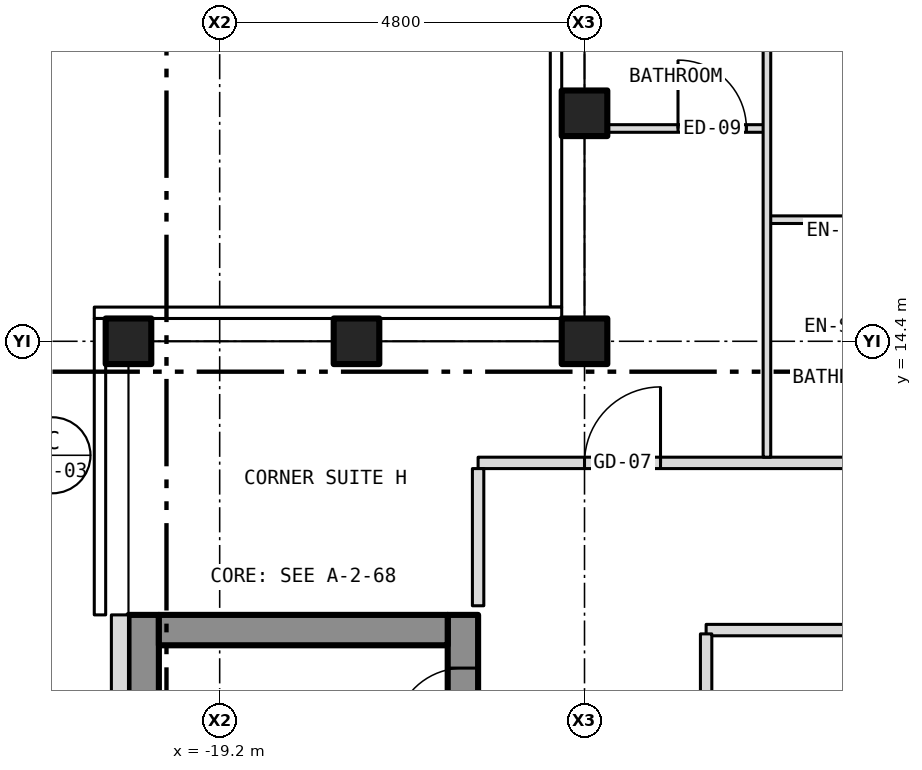
"""IFC4 building model, lengths in metres.
Left out: names, types, materials, properties, quantities, classifications, styles, units other than length and angle.
Written with IfcOpenShell. Run it as: python <this file> out.ifc"""

import sys

from ifc_helpers import new_model, si_unit, direction, frame, frame_2d, origin, origin_2d, place, context, subcontext, project, spatial, rectangle, hollow_rectangle, extrude, element, fill, save


model = new_model("IFC4")
c1 = context("Model", 3, precision=1e-05, world=origin(), true_north=direction((0.0, 1.0)))
c2 = subcontext(c1, "Body", "Model", "MODEL_VIEW")
j1 = project(units=[si_unit("LENGTHUNIT", "METRE"), si_unit("PLANEANGLEUNIT", "RADIAN")], contexts=[c1])
p1 = place(None, origin())
s1 = spatial("IfcSite", under=j1, at=p1, CompositionType="ELEMENT")
p2 = place(p1, origin())
s2 = spatial("IfcBuilding", under=s1, at=p2, CompositionType="ELEMENT")
p3 = place(p2, frame((0.0, 0.0, 248.0)))
s3 = spatial("IfcBuildingStorey", under=s2, at=p3, CompositionType="ELEMENT", Elevation=248.0)
for number, where, z_axis, x_axis in (
    (1, (-20.4, 14.4, -0.15), (0.0, 0.0, 1.0), (1.0, 0.0, 0.0)),
    (2, (-14.4, 14.4, -0.15), (0.0, 0.0, 1.0), (1.0, 0.0, 0.0)),
    (3, (-14.4, 17.4, -0.15), (0.0, 0.0, 1.0), (1.0, 0.0, 0.0)),
    (4, (-17.4, 14.4, -0.15), (0.0, 0.0, 1.0), (1.0, 0.0, 0.0)),
):
    element("IfcColumn", number, at=place(p3, frame(where, z_axis=z_axis, x_axis=x_axis)), inside=s3, PredefinedType="COLUMN", context=c2, shape_type="SweptSolid", body=[
        extrude(hollow_rectangle(XDim=0.6, YDim=0.6, WallThickness=0.03, at=origin_2d()), origin(), (0.0, 0.0, 1.0), 3.5),
    ])
p4 = place(p3, frame((-16.0, -10.8, 0.0), z_axis=(0.0, 0.0, 1.0), x_axis=(0.0, 1.0, 0.0)))
e5 = element("IfcWall", 5, at=p4, inside=s3, PredefinedType="SHEAR", context=c2, shape_type="SweptSolid", body=[
    extrude(rectangle(XDim=21.6, YDim=0.4, at=frame_2d((10.8, 0.0))), origin(), (0.0, 0.0, 1.0), 3.25),
])
p5 = place(p4, frame((9.4, 0.0, 0.0)))
e6 = element("IfcOpeningElement", 6, at=p5, cuts=e5, PredefinedType="OPENING", context=c2, shape_type="SweptSolid", body=[
    extrude(rectangle(XDim=1.1, YDim=2.1, at=frame_2d((0.55, 1.05))), frame((0.0, 0.212, 0.0), z_axis=(0.0, -1.0, 0.0), x_axis=(1.0, 0.0, 0.0)), (0.0, 0.0, 1.0), 0.424),
])
p6 = place(p4, frame((11.5, 0.0, 0.0)))
e7 = element("IfcOpeningElement", 7, at=p6, cuts=e5, PredefinedType="OPENING", context=c2, shape_type="SweptSolid", body=[
    extrude(rectangle(XDim=1.1, YDim=2.1, at=frame_2d((0.55, 1.05))), frame((0.0, 0.212, 0.0), z_axis=(0.0, -1.0, 0.0), x_axis=(1.0, 0.0, 0.0)), (0.0, 0.0, 1.0), 0.424),
])
p7 = place(p4, frame((13.6, 0.0, 0.0)))
e8 = element("IfcOpeningElement", 8, at=p7, cuts=e5, PredefinedType="OPENING", context=c2, shape_type="SweptSolid", body=[
    extrude(rectangle(XDim=1.1, YDim=2.1, at=frame_2d((0.55, 1.05))), frame((0.0, 0.212, 0.0), z_axis=(0.0, -1.0, 0.0), x_axis=(1.0, 0.0, 0.0)), (0.0, 0.0, 1.0), 0.424),
])
p8 = place(p4, frame((15.7, 0.0, 0.0)))
e9 = element("IfcOpeningElement", 9, at=p8, cuts=e5, PredefinedType="OPENING", context=c2, shape_type="SweptSolid", body=[
    extrude(rectangle(XDim=1.1, YDim=2.1, at=frame_2d((0.55, 1.05))), frame((0.0, 0.212, 0.0), z_axis=(0.0, -1.0, 0.0), x_axis=(1.0, 0.0, 0.0)), (0.0, 0.0, 1.0), 0.424),
])
p9 = place(p4, frame((17.8, 0.0, 0.0)))
e10 = element("IfcOpeningElement", 10, at=p9, cuts=e5, PredefinedType="OPENING", context=c2, shape_type="SweptSolid", body=[
    extrude(rectangle(XDim=1.1, YDim=2.1, at=frame_2d((0.55, 1.05))), frame((0.0, 0.212, 0.0), z_axis=(0.0, -1.0, 0.0), x_axis=(1.0, 0.0, 0.0)), (0.0, 0.0, 1.0), 0.424),
])
p10 = place(p4, frame((0.458, 0.0, 0.0)))
e11 = element("IfcOpeningElement", 11, at=p10, cuts=e5, PredefinedType="OPENING", context=c2, shape_type="SweptSolid", body=[
    extrude(rectangle(XDim=1.1, YDim=2.1, at=frame_2d((0.55, 1.05))), frame((0.0, 0.212, 0.0), z_axis=(0.0, -1.0, 0.0), x_axis=(1.0, 0.0, 0.0)), (0.0, 0.0, 1.0), 0.424),
])
p11 = place(p4, frame((7.5, 0.0, 0.0)))
e12 = element("IfcOpeningElement", 12, at=p11, cuts=e5, PredefinedType="OPENING", context=c2, shape_type="SweptSolid", body=[
    extrude(rectangle(XDim=1.1, YDim=2.1, at=frame_2d((0.55, 1.05))), frame((0.0, 0.212, 0.0), z_axis=(0.0, -1.0, 0.0), x_axis=(1.0, 0.0, 0.0)), (0.0, 0.0, 1.0), 0.424),
])
p12 = place(p4, frame((20.0, 0.0, 0.0)))
e13 = element("IfcOpeningElement", 13, at=p12, cuts=e5, PredefinedType="OPENING", context=c2, shape_type="SweptSolid", body=[
    extrude(rectangle(XDim=0.9, YDim=2.1, at=frame_2d((0.45, 1.05))), frame((0.0, 0.212, 0.0), z_axis=(0.0, -1.0, 0.0), x_axis=(1.0, 0.0, 0.0)), (0.0, 0.0, 1.0), 0.424),
])
p13 = place(p3, frame((-20.2, -10.8, 0.0), z_axis=(0.0, 0.0, 1.0), x_axis=(0.0, 1.0, 0.0)))
e14 = element("IfcWall", 14, at=p13, inside=s3, PredefinedType="SHEAR", context=c2, shape_type="SweptSolid", body=[
    extrude(rectangle(XDim=21.6, YDim=0.4, at=frame_2d((10.8, 0.0))), origin(), (0.0, 0.0, 1.0), 3.25),
])
p14 = place(p3, frame((-20.0, 10.6, 0.0), z_axis=(0.0, 0.0, 1.0), x_axis=(1.0, 0.0, 0.0)))
e15 = element("IfcWall", 15, at=p14, inside=s3, PredefinedType="SHEAR", context=c2, shape_type="SweptSolid", body=[
    extrude(rectangle(XDim=3.8, YDim=0.4, at=frame_2d((1.9, 0.0))), origin(), (0.0, 0.0, 1.0), 3.25),
])
p15 = place(p3, frame((-20.512, 10.8, 0.0), z_axis=(0.0, 0.0, 1.0), x_axis=(0.0, -1.0, 0.0)))
e16 = element("IfcWall", 16, at=p15, inside=s3, PredefinedType="SOLIDWALL", context=c2, shape_type="SweptSolid", body=[
    extrude(rectangle(XDim=21.6, YDim=0.225, at=frame_2d((10.8, 0.0))), origin(), (0.0, 0.0, 1.0), 3.5),
])
p16 = place(p15, frame((18.05, 0.0, 1.0)))
e17 = element("IfcOpeningElement", 17, at=p16, cuts=e16, PredefinedType="OPENING", context=c2, shape_type="SweptSolid", body=[
    extrude(rectangle(XDim=0.6, YDim=1.5, at=frame_2d((0.3, 0.75))), frame((0.0, 0.125, 0.0), z_axis=(0.0, -1.0, 0.0), x_axis=(1.0, 0.0, 0.0)), (0.0, 0.0, 1.0), 0.249),
])
p17 = place(p3, frame((-12.8, 10.6, 0.0), z_axis=(0.0, 0.0, 1.0), x_axis=(1.0, 0.0, 0.0)))
e18 = element("IfcWall", 18, at=p17, inside=s3, PredefinedType="PARTITIONING", context=c2, shape_type="SweptSolid", body=[
    extrude(rectangle(XDim=20.3, YDim=0.15, at=frame_2d((10.15, 0.0))), origin(), (0.0, 0.0, 1.0), 3.35),
])
p18 = place(p17, frame((5.95, 0.0, 0.0)))
e19 = element("IfcOpeningElement", 19, at=p18, cuts=e18, PredefinedType="OPENING", context=c2, shape_type="SweptSolid", body=[
    extrude(rectangle(XDim=0.9, YDim=2.1, at=frame_2d((0.45, 1.05))), frame((0.0, 0.087, 0.0), z_axis=(0.0, -1.0, 0.0), x_axis=(1.0, 0.0, 0.0)), (0.0, 0.0, 1.0), 0.174),
])
p19 = place(p3, frame((-15.8, 12.8, 0.0), z_axis=(0.0, 0.0, 1.0), x_axis=(1.0, 0.0, 0.0)))
e20 = element("IfcWall", 20, at=p19, inside=s3, PredefinedType="PARTITIONING", context=c2, shape_type="SweptSolid", body=[
    extrude(rectangle(XDim=31.6, YDim=0.15, at=frame_2d((15.8, 0.0))), origin(), (0.0, 0.0, 1.0), 3.35),
])
p20 = place(p19, frame((6.8, 0.0, 0.0)))
e21 = element("IfcOpeningElement", 21, at=p20, cuts=e20, PredefinedType="OPENING", context=c2, shape_type="SweptSolid", body=[
    extrude(rectangle(XDim=1.0, YDim=2.1, at=frame_2d((0.5, 1.05))), frame((0.0, 0.087, 0.0), z_axis=(0.0, -1.0, 0.0), x_axis=(1.0, 0.0, 0.0)), (0.0, 0.0, 1.0), 0.174),
])
p21 = place(p19, frame((15.35, 0.0, 0.0)))
e22 = element("IfcOpeningElement", 22, at=p21, cuts=e20, PredefinedType="OPENING", context=c2, shape_type="SweptSolid", body=[
    extrude(rectangle(XDim=0.9, YDim=2.1, at=frame_2d((0.45, 1.05))), frame((0.0, 0.087, 0.0), z_axis=(0.0, -1.0, 0.0), x_axis=(1.0, 0.0, 0.0)), (0.0, 0.0, 1.0), 0.174),
])
p22 = place(p19, frame((26.0, 0.0, 0.0)))
e23 = element("IfcOpeningElement", 23, at=p22, cuts=e20, PredefinedType="OPENING", context=c2, shape_type="SweptSolid", body=[
    extrude(rectangle(XDim=1.0, YDim=2.1, at=frame_2d((0.5, 1.05))), frame((0.0, 0.087, 0.0), z_axis=(0.0, -1.0, 0.0), x_axis=(1.0, 0.0, 0.0)), (0.0, 0.0, 1.0), 0.174),
])
p23 = place(p19, frame((1.4, 0.0, 0.0)))
e24 = element("IfcOpeningElement", 24, at=p23, cuts=e20, PredefinedType="OPENING", context=c2, shape_type="SweptSolid", body=[
    extrude(rectangle(XDim=1.0, YDim=2.1, at=frame_2d((0.5, 1.05))), frame((0.0, 0.087, 0.0), z_axis=(0.0, -1.0, 0.0), x_axis=(1.0, 0.0, 0.0)), (0.0, 0.0, 1.0), 0.174),
])
p24 = place(p19, frame((29.2, 0.0, 0.0)))
e25 = element("IfcOpeningElement", 25, at=p24, cuts=e20, PredefinedType="OPENING", context=c2, shape_type="SweptSolid", body=[
    extrude(rectangle(XDim=1.0, YDim=2.1, at=frame_2d((0.5, 1.05))), frame((0.0, 0.087, 0.0), z_axis=(0.0, -1.0, 0.0), x_axis=(1.0, 0.0, 0.0)), (0.0, 0.0, 1.0), 0.174),
])
p25 = place(p3, frame((-12.0, 16.0, 0.0), z_axis=(0.0, 0.0, 1.0), x_axis=(1.0, 0.0, 0.0)))
e26 = element("IfcWall", 26, at=p25, inside=s3, PredefinedType="PARTITIONING", context=c2, shape_type="SweptSolid", body=[
    extrude(rectangle(XDim=2.2, YDim=0.1, at=frame_2d((1.1, 0.0))), origin(), (0.0, 0.0, 1.0), 3.35),
])
p26 = place(p3, frame((-14.28, 17.2, 0.0), z_axis=(0.0, 0.0, 1.0), x_axis=(1.0, 0.0, 0.0)))
e27 = element("IfcWall", 27, at=p26, inside=s3, PredefinedType="PARTITIONING", context=c2, shape_type="SweptSolid", body=[
    extrude(rectangle(XDim=2.28, YDim=0.1, at=frame_2d((1.14, 0.0))), origin(), (0.0, 0.0, 1.0), 3.35),
])
p27 = place(p26, frame((1.11, 0.0, 0.0)))
e28 = element("IfcOpeningElement", 28, at=p27, cuts=e27, PredefinedType="OPENING", context=c2, shape_type="SweptSolid", body=[
    extrude(rectangle(XDim=0.9, YDim=2.1, at=frame_2d((0.45, 1.05))), frame((0.0, 0.062, 0.0), z_axis=(0.0, -1.0, 0.0), x_axis=(1.0, 0.0, 0.0)), (0.0, 0.0, 1.0), 0.124),
])
p28 = place(p3, frame((-15.8, 10.92, 0.0), z_axis=(0.0, 0.0, 1.0), x_axis=(0.0, 1.0, 0.0)))
e29 = element("IfcWall", 29, at=p28, inside=s3, PredefinedType="PARTITIONING", context=c2, shape_type="SweptSolid", body=[
    extrude(rectangle(XDim=1.805, YDim=0.15, at=frame_2d((0.903, 0.0))), origin(), (0.0, 0.0, 1.0), 3.35),
])
p29 = place(p3, frame((-12.8, 3.375, 0.0), z_axis=(0.0, 0.0, 1.0), x_axis=(0.0, 1.0, 0.0)))
e30 = element("IfcWall", 30, at=p29, inside=s3, PredefinedType="PARTITIONING", context=c2, shape_type="SweptSolid", body=[
    extrude(rectangle(XDim=7.175, YDim=0.15, at=frame_2d((3.587, 0.0))), origin(), (0.0, 0.0, 1.0), 3.35),
])
p30 = place(p3, frame((-12.0, 12.875, 0.0), z_axis=(0.0, 0.0, 1.0), x_axis=(0.0, 1.0, 0.0)))
e31 = element("IfcWall", 31, at=p30, inside=s3, PredefinedType="PARTITIONING", context=c2, shape_type="SweptSolid", body=[
    extrude(rectangle(XDim=7.855, YDim=0.1, at=frame_2d((3.927, 0.0))), origin(), (0.0, 0.0, 1.0), 3.35),
])
p31 = place(p12, origin())
e32 = element("IfcDoor", 32, at=p31, inside=s3, OperationType="SINGLE_SWING_LEFT", PredefinedType="DOOR", context=c2, shape_type="SweptSolid", body=[
    extrude(rectangle(XDim=0.9, YDim=2.1, at=frame_2d((0.45, 1.05))), frame((0.0, 0.025, 0.0), z_axis=(0.0, -1.0, 0.0), x_axis=(1.0, 0.0, 0.0)), (0.0, 0.0, 1.0), 0.05),
])
fill(e13, e32)
p32 = place(p27, origin())
e33 = element("IfcDoor", 33, at=p32, inside=s3, OperationType="SINGLE_SWING_LEFT", PredefinedType="DOOR", context=c2, shape_type="SweptSolid", body=[
    extrude(rectangle(XDim=0.9, YDim=2.1, at=frame_2d((0.45, 1.05))), frame((0.0, 0.025, 0.0), z_axis=(0.0, -1.0, 0.0), x_axis=(1.0, 0.0, 0.0)), (0.0, 0.0, 1.0), 0.05),
])
fill(e28, e33)
p33 = place(p23, origin())
e34 = element("IfcDoor", 34, at=p33, inside=s3, OperationType="SINGLE_SWING_RIGHT", PredefinedType="DOOR", context=c2, shape_type="SweptSolid", body=[
    extrude(rectangle(XDim=1.0, YDim=2.1, at=frame_2d((0.5, 1.05))), frame((0.0, 0.025, 0.0), z_axis=(0.0, -1.0, 0.0), x_axis=(1.0, 0.0, 0.0)), (0.0, 0.0, 1.0), 0.05),
])
fill(e24, e34)
save(model, sys.argv[1])
